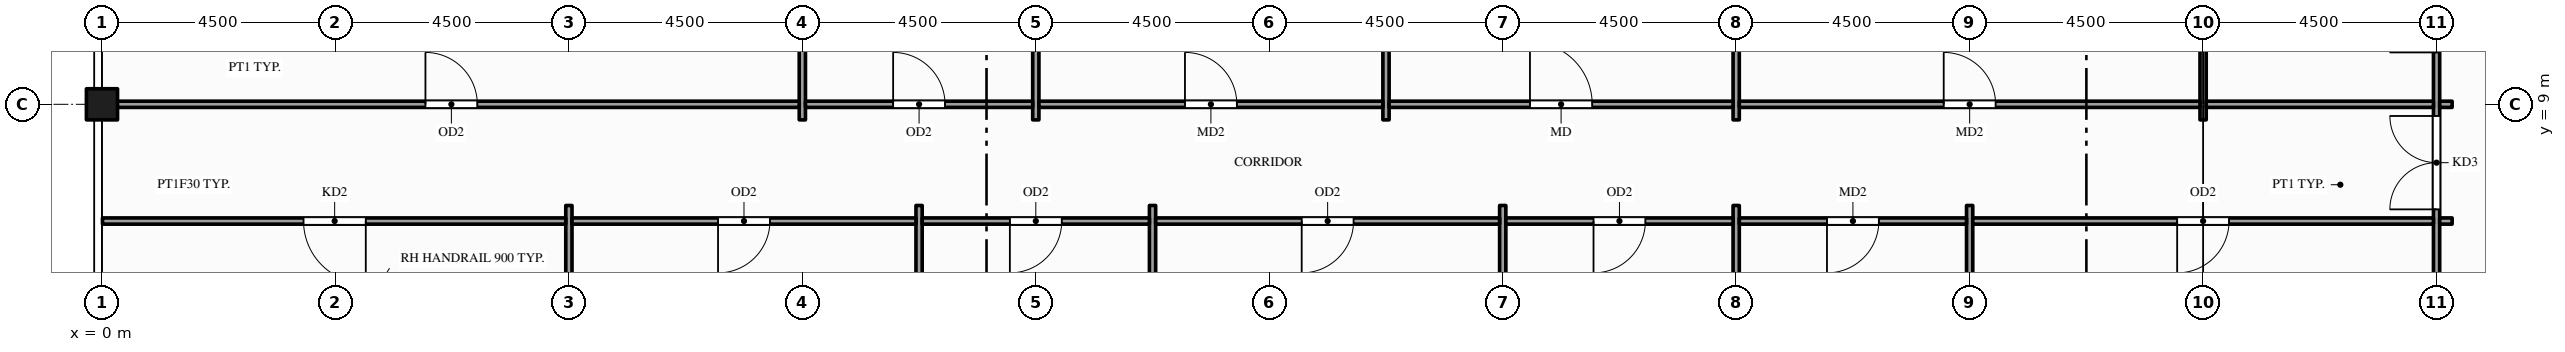
"""IFC4 building model, lengths in metres.
Left out: names, types, materials, properties, quantities, classifications, styles, units other than length and angle.
Written with IfcOpenShell. Run it as: python <this file> out.ifc"""

import sys

from ifc_helpers import new_model, si_unit, direction, frame, frame_2d, origin, origin_2d, place, context, subcontext, project, spatial, rectangle, hollow_rectangle, extrude, element, fill, save


model = new_model("IFC4")
c1 = context("Model", 3, precision=1e-05, world=origin(), true_north=direction((0.0, 1.0)))
c2 = subcontext(c1, "Body", "Model", "MODEL_VIEW")
j1 = project(units=[si_unit("LENGTHUNIT", "METRE"), si_unit("PLANEANGLEUNIT", "RADIAN")], contexts=[c1])
p1 = place(None, origin())
s1 = spatial("IfcSite", under=j1, at=p1, CompositionType="ELEMENT")
p2 = place(p1, origin())
s2 = spatial("IfcBuilding", under=s1, at=p2, CompositionType="ELEMENT")
p3 = place(p2, frame((0.0, 0.0, 341.0)))
s3 = spatial("IfcBuildingStorey", under=s2, at=p3, CompositionType="ELEMENT", Elevation=341.0)
p4 = place(p3, frame((0.0, 9.0, -0.15), z_axis=(0.0, 0.0, 1.0), x_axis=(1.0, 0.0, 0.0)))
e1 = element("IfcColumn", 1, at=p4, inside=s3, PredefinedType="COLUMN", context=c2, shape_type="SweptSolid", body=[
    extrude(hollow_rectangle(XDim=0.6, YDim=0.6, WallThickness=0.03, at=origin_2d()), origin(), (0.0, 0.0, 1.0), 4.4),
])
p5 = place(p3, frame((9.0, 3.875, 0.0), z_axis=(0.0, 0.0, 1.0), x_axis=(0.0, 1.0, 0.0)))
e2 = element("IfcWall", 2, at=p5, inside=s3, PredefinedType="PARTITIONING", context=c2, shape_type="SweptSolid", body=[
    extrude(rectangle(XDim=3.175, YDim=0.12, at=frame_2d((1.587, 0.0))), origin(), (0.0, 0.0, 1.0), 3.259),
])
p6 = place(p3, frame((13.5, 8.7, 0.0), z_axis=(0.0, 0.0, 1.0), x_axis=(0.0, 1.0, 0.0)))
e3 = element("IfcWall", 3, at=p6, inside=s3, PredefinedType="PARTITIONING", context=c2, shape_type="SweptSolid", body=[
    extrude(rectangle(XDim=13.79, YDim=0.12, at=frame_2d((6.895, 0.0))), origin(), (0.0, 0.0, 1.0), 3.259),
])
p7 = place(p3, frame((15.75, 0.01, 0.0), z_axis=(0.0, 0.0, 1.0), x_axis=(0.0, 1.0, 0.0)))
e4 = element("IfcWall", 4, at=p7, inside=s3, PredefinedType="PARTITIONING", context=c2, shape_type="SweptSolid", body=[
    extrude(rectangle(XDim=7.04, YDim=0.12, at=frame_2d((3.52, 0.0))), origin(), (0.0, 0.0, 1.0), 3.259),
])
p8 = place(p3, frame((18.0, 8.7, 0.0), z_axis=(0.0, 0.0, 1.0), x_axis=(0.0, 1.0, 0.0)))
e5 = element("IfcWall", 5, at=p8, inside=s3, PredefinedType="PARTITIONING", context=c2, shape_type="SweptSolid", body=[
    extrude(rectangle(XDim=13.79, YDim=0.12, at=frame_2d((6.895, 0.0))), origin(), (0.0, 0.0, 1.0), 3.259),
])
p9 = place(p3, frame((20.25, 0.01, 0.0), z_axis=(0.0, 0.0, 1.0), x_axis=(0.0, 1.0, 0.0)))
e6 = element("IfcWall", 6, at=p9, inside=s3, PredefinedType="PARTITIONING", context=c2, shape_type="SweptSolid", body=[
    extrude(rectangle(XDim=7.04, YDim=0.12, at=frame_2d((3.52, 0.0))), origin(), (0.0, 0.0, 1.0), 3.259),
])
p10 = place(p3, frame((24.75, 8.7, 0.0), z_axis=(0.0, 0.0, 1.0), x_axis=(0.0, 1.0, 0.0)))
e7 = element("IfcWall", 7, at=p10, inside=s3, PredefinedType="PARTITIONING", context=c2, shape_type="SweptSolid", body=[
    extrude(rectangle(XDim=13.79, YDim=0.12, at=frame_2d((6.895, 0.0))), origin(), (0.0, 0.0, 1.0), 3.259),
])
for number, where, z_axis, x_axis in (
    (8, (27.0, 0.01, 0.0), (0.0, 0.0, 1.0), (0.0, 1.0, 0.0)),
    (9, (31.5, 0.01, 0.0), (0.0, 0.0, 1.0), (0.0, 1.0, 0.0)),
):
    element("IfcWall", number, at=place(p3, frame(where, z_axis=z_axis, x_axis=x_axis)), inside=s3, PredefinedType="PARTITIONING", context=c2, shape_type="SweptSolid", body=[
        extrude(rectangle(XDim=7.04, YDim=0.12, at=frame_2d((3.52, 0.0))), origin(), (0.0, 0.0, 1.0), 3.259),
    ])
p11 = place(p3, frame((31.5, 8.7, 0.0), z_axis=(0.0, 0.0, 1.0), x_axis=(0.0, 1.0, 0.0)))
e10 = element("IfcWall", 10, at=p11, inside=s3, PredefinedType="PARTITIONING", context=c2, shape_type="SweptSolid", body=[
    extrude(rectangle(XDim=13.79, YDim=0.12, at=frame_2d((6.895, 0.0))), origin(), (0.0, 0.0, 1.0), 3.259),
])
p12 = place(p3, frame((36.0, 0.01, 0.0), z_axis=(0.0, 0.0, 1.0), x_axis=(0.0, 1.0, 0.0)))
e11 = element("IfcWall", 11, at=p12, inside=s3, PredefinedType="PARTITIONING", context=c2, shape_type="SweptSolid", body=[
    extrude(rectangle(XDim=7.04, YDim=0.12, at=frame_2d((3.52, 0.0))), origin(), (0.0, 0.0, 1.0), 3.259),
])
p13 = place(p3, frame((40.5, 8.7, 0.0), z_axis=(0.0, 0.0, 1.0), x_axis=(0.0, 1.0, 0.0)))
e12 = element("IfcWall", 12, at=p13, inside=s3, PredefinedType="PARTITIONING", context=c2, shape_type="SweptSolid", body=[
    extrude(rectangle(XDim=13.79, YDim=0.12, at=frame_2d((6.895, 0.0))), origin(), (0.0, 0.0, 1.0), 4.3),
])
p14 = place(p3, frame((45.0, 0.01, 0.0), z_axis=(0.0, 0.0, 1.0), x_axis=(0.0, 1.0, 0.0)))
e13 = element("IfcWall", 13, at=p14, inside=s3, PredefinedType="PARTITIONING", context=c2, shape_type="SweptSolid", body=[
    extrude(rectangle(XDim=22.48, YDim=0.12, at=frame_2d((11.24, 0.0))), origin(), (0.0, 0.0, 1.0), 3.309),
])
p15 = place(p14, frame((6.965, 0.0, 0.0)))
e14 = element("IfcOpeningElement", 14, at=p15, cuts=e13, PredefinedType="OPENING", context=c2, shape_type="SweptSolid", body=[
    extrude(rectangle(XDim=1.8, YDim=2.1, at=frame_2d((0.9, 1.05))), frame((0.0, 0.07, 0.0), z_axis=(0.0, -1.0, 0.0), x_axis=(1.0, 0.0, 0.0)), (0.0, 0.0, 1.0), 0.14),
])
p16 = place(p14, frame((9.99, 0.0, 0.0)))
e15 = element("IfcOpeningElement", 15, at=p16, cuts=e13, PredefinedType="OPENING", context=c2, shape_type="SweptSolid", body=[
    extrude(rectangle(XDim=0.9, YDim=2.1, at=frame_2d((0.45, 1.05))), frame((0.0, 0.07, 0.0), z_axis=(0.0, -1.0, 0.0), x_axis=(1.0, 0.0, 0.0)), (0.0, 0.0, 1.0), 0.14),
])
p17 = place(p14, frame((15.29, 0.0, 0.0)))
e16 = element("IfcOpeningElement", 16, at=p17, cuts=e13, PredefinedType="OPENING", context=c2, shape_type="SweptSolid", body=[
    extrude(rectangle(XDim=0.9, YDim=2.1, at=frame_2d((0.45, 1.05))), frame((0.0, 0.07, 0.0), z_axis=(0.0, -1.0, 0.0), x_axis=(1.0, 0.0, 0.0)), (0.0, 0.0, 1.0), 0.14),
])
p18 = place(p14, frame((20.49, 0.0, 0.0)))
e17 = element("IfcOpeningElement", 17, at=p18, cuts=e13, PredefinedType="OPENING", context=c2, shape_type="SweptSolid", body=[
    extrude(rectangle(XDim=1.0, YDim=2.1, at=frame_2d((0.5, 1.05))), frame((0.0, 0.07, 0.0), z_axis=(0.0, -1.0, 0.0), x_axis=(1.0, 0.0, 0.0)), (0.0, 0.0, 1.0), 0.14),
])
p19 = place(p3, frame((0.01, 6.75, 0.0), z_axis=(0.0, 0.0, 1.0), x_axis=(1.0, 0.0, 0.0)))
e18 = element("IfcWall", 18, at=p19, inside=s3, PredefinedType="PARTITIONING", context=c2, shape_type="SweptSolid", body=[
    extrude(rectangle(XDim=8.93, YDim=0.12, at=frame_2d((4.465, 0.0))), origin(), (0.0, 0.0, 1.0), 3.259),
])
p20 = place(p19, frame((3.875, 0.0, 0.0)))
e19 = element("IfcOpeningElement", 19, at=p20, cuts=e18, PredefinedType="OPENING", context=c2, shape_type="SweptSolid", body=[
    extrude(rectangle(XDim=1.2, YDim=2.1, at=frame_2d((0.6, 1.05))), frame((0.0, 0.07, 0.0), z_axis=(0.0, -1.0, 0.0), x_axis=(1.0, 0.0, 0.0)), (0.0, 0.0, 1.0), 0.14),
])
p21 = place(p3, frame((9.06, 6.75, 0.0), z_axis=(0.0, 0.0, 1.0), x_axis=(1.0, 0.0, 0.0)))
e20 = element("IfcWall", 20, at=p21, inside=s3, PredefinedType="PARTITIONING", context=c2, shape_type="SweptSolid", body=[
    extrude(rectangle(XDim=6.63, YDim=0.12, at=frame_2d((3.315, 0.0))), origin(), (0.0, 0.0, 1.0), 3.259),
])
p22 = place(p21, frame((2.815, 0.0, 0.0)))
e21 = element("IfcOpeningElement", 21, at=p22, cuts=e20, PredefinedType="OPENING", context=c2, shape_type="SweptSolid", body=[
    extrude(rectangle(XDim=1.0, YDim=2.1, at=frame_2d((0.5, 1.05))), frame((0.0, 0.07, 0.0), z_axis=(0.0, -1.0, 0.0), x_axis=(1.0, 0.0, 0.0)), (0.0, 0.0, 1.0), 0.14),
])
p23 = place(p3, frame((15.81, 6.75, 0.0), z_axis=(0.0, 0.0, 1.0), x_axis=(1.0, 0.0, 0.0)))
e22 = element("IfcWall", 22, at=p23, inside=s3, PredefinedType="PARTITIONING", context=c2, shape_type="SweptSolid", body=[
    extrude(rectangle(XDim=4.38, YDim=0.12, at=frame_2d((2.19, 0.0))), origin(), (0.0, 0.0, 1.0), 3.259),
])
p24 = place(p23, frame((1.69, 0.0, 0.0)))
e23 = element("IfcOpeningElement", 23, at=p24, cuts=e22, PredefinedType="OPENING", context=c2, shape_type="SweptSolid", body=[
    extrude(rectangle(XDim=1.0, YDim=2.1, at=frame_2d((0.5, 1.05))), frame((0.0, 0.07, 0.0), z_axis=(0.0, -1.0, 0.0), x_axis=(1.0, 0.0, 0.0)), (0.0, 0.0, 1.0), 0.14),
])
p25 = place(p3, frame((20.31, 6.75, 0.0), z_axis=(0.0, 0.0, 1.0), x_axis=(1.0, 0.0, 0.0)))
e24 = element("IfcWall", 24, at=p25, inside=s3, PredefinedType="PARTITIONING", context=c2, shape_type="SweptSolid", body=[
    extrude(rectangle(XDim=6.63, YDim=0.12, at=frame_2d((3.315, 0.0))), origin(), (0.0, 0.0, 1.0), 3.259),
])
p26 = place(p25, frame((2.815, 0.0, 0.0)))
e25 = element("IfcOpeningElement", 25, at=p26, cuts=e24, PredefinedType="OPENING", context=c2, shape_type="SweptSolid", body=[
    extrude(rectangle(XDim=1.0, YDim=2.1, at=frame_2d((0.5, 1.05))), frame((0.0, 0.07, 0.0), z_axis=(0.0, -1.0, 0.0), x_axis=(1.0, 0.0, 0.0)), (0.0, 0.0, 1.0), 0.14),
])
p27 = place(p3, frame((27.06, 6.75, 0.0), z_axis=(0.0, 0.0, 1.0), x_axis=(1.0, 0.0, 0.0)))
e26 = element("IfcWall", 26, at=p27, inside=s3, PredefinedType="PARTITIONING", context=c2, shape_type="SweptSolid", body=[
    extrude(rectangle(XDim=4.38, YDim=0.12, at=frame_2d((2.19, 0.0))), origin(), (0.0, 0.0, 1.0), 3.259),
])
p28 = place(p27, frame((1.69, 0.0, 0.0)))
e27 = element("IfcOpeningElement", 27, at=p28, cuts=e26, PredefinedType="OPENING", context=c2, shape_type="SweptSolid", body=[
    extrude(rectangle(XDim=1.0, YDim=2.1, at=frame_2d((0.5, 1.05))), frame((0.0, 0.07, 0.0), z_axis=(0.0, -1.0, 0.0), x_axis=(1.0, 0.0, 0.0)), (0.0, 0.0, 1.0), 0.14),
])
p29 = place(p3, frame((31.56, 6.75, 0.0), z_axis=(0.0, 0.0, 1.0), x_axis=(1.0, 0.0, 0.0)))
e28 = element("IfcWall", 28, at=p29, inside=s3, PredefinedType="PARTITIONING", context=c2, shape_type="SweptSolid", body=[
    extrude(rectangle(XDim=4.38, YDim=0.12, at=frame_2d((2.19, 0.0))), origin(), (0.0, 0.0, 1.0), 3.259),
])
p30 = place(p29, frame((1.69, 0.0, 0.0)))
e29 = element("IfcOpeningElement", 29, at=p30, cuts=e28, PredefinedType="OPENING", context=c2, shape_type="SweptSolid", body=[
    extrude(rectangle(XDim=1.0, YDim=2.1, at=frame_2d((0.5, 1.05))), frame((0.0, 0.07, 0.0), z_axis=(0.0, -1.0, 0.0), x_axis=(1.0, 0.0, 0.0)), (0.0, 0.0, 1.0), 0.14),
])
p31 = place(p3, frame((36.06, 6.75, 0.0), z_axis=(0.0, 0.0, 1.0), x_axis=(1.0, 0.0, 0.0)))
e30 = element("IfcWall", 30, at=p31, inside=s3, PredefinedType="PARTITIONING", context=c2, shape_type="SweptSolid", body=[
    extrude(rectangle(XDim=8.88, YDim=0.12, at=frame_2d((4.44, 0.0))), origin(), (0.0, 0.0, 1.0), 3.259),
])
p32 = place(p31, frame((3.94, 0.0, 0.0)))
e31 = element("IfcOpeningElement", 31, at=p32, cuts=e30, PredefinedType="OPENING", context=c2, shape_type="SweptSolid", body=[
    extrude(rectangle(XDim=1.0, YDim=2.1, at=frame_2d((0.5, 1.05))), frame((0.0, 0.07, 0.0), z_axis=(0.0, -1.0, 0.0), x_axis=(1.0, 0.0, 0.0)), (0.0, 0.0, 1.0), 0.14),
])
p33 = place(p3, frame((45.06, 6.75, 0.0), z_axis=(0.0, 0.0, 1.0), x_axis=(1.0, 0.0, 0.0)))
e32 = element("IfcWall", 32, at=p33, inside=s3, PredefinedType="PARTITIONING", context=c2, shape_type="SweptSolid", body=[
    extrude(rectangle(XDim=0.24, YDim=0.12, at=frame_2d((0.12, 0.0))), origin(), (0.0, 0.0, 1.0), 3.309),
])
p34 = place(p3, frame((0.01, 9.0, 0.0), z_axis=(0.0, 0.0, 1.0), x_axis=(1.0, 0.0, 0.0)))
e33 = element("IfcWall", 33, at=p34, inside=s3, PredefinedType="PARTITIONING", context=c2, shape_type="SweptSolid", body=[
    extrude(rectangle(XDim=13.43, YDim=0.12, at=frame_2d((6.715, 0.0))), origin(), (0.0, 0.0, 1.0), 3.259),
])
p35 = place(p34, frame((6.225, 0.0, 0.0)))
e34 = element("IfcOpeningElement", 34, at=p35, cuts=e33, PredefinedType="OPENING", context=c2, shape_type="SweptSolid", body=[
    extrude(rectangle(XDim=1.0, YDim=2.1, at=frame_2d((0.5, 1.05))), frame((0.0, 0.07, 0.0), z_axis=(0.0, -1.0, 0.0), x_axis=(1.0, 0.0, 0.0)), (0.0, 0.0, 1.0), 0.14),
])
p36 = place(p3, frame((13.56, 9.0, 0.0), z_axis=(0.0, 0.0, 1.0), x_axis=(1.0, 0.0, 0.0)))
e35 = element("IfcWall", 35, at=p36, inside=s3, PredefinedType="PARTITIONING", context=c2, shape_type="SweptSolid", body=[
    extrude(rectangle(XDim=4.38, YDim=0.12, at=frame_2d((2.19, 0.0))), origin(), (0.0, 0.0, 1.0), 3.259),
])
p37 = place(p36, frame((1.69, 0.0, 0.0)))
e36 = element("IfcOpeningElement", 36, at=p37, cuts=e35, PredefinedType="OPENING", context=c2, shape_type="SweptSolid", body=[
    extrude(rectangle(XDim=1.0, YDim=2.1, at=frame_2d((0.5, 1.05))), frame((0.0, 0.07, 0.0), z_axis=(0.0, -1.0, 0.0), x_axis=(1.0, 0.0, 0.0)), (0.0, 0.0, 1.0), 0.14),
])
p38 = place(p3, frame((18.06, 9.0, 0.0), z_axis=(0.0, 0.0, 1.0), x_axis=(1.0, 0.0, 0.0)))
e37 = element("IfcWall", 37, at=p38, inside=s3, PredefinedType="PARTITIONING", context=c2, shape_type="SweptSolid", body=[
    extrude(rectangle(XDim=6.63, YDim=0.12, at=frame_2d((3.315, 0.0))), origin(), (0.0, 0.0, 1.0), 3.259),
])
p39 = place(p38, frame((2.815, 0.0, 0.0)))
e38 = element("IfcOpeningElement", 38, at=p39, cuts=e37, PredefinedType="OPENING", context=c2, shape_type="SweptSolid", body=[
    extrude(rectangle(XDim=1.0, YDim=2.1, at=frame_2d((0.5, 1.05))), frame((0.0, 0.07, 0.0), z_axis=(0.0, -1.0, 0.0), x_axis=(1.0, 0.0, 0.0)), (0.0, 0.0, 1.0), 0.14),
])
p40 = place(p3, frame((24.81, 9.0, 0.0), z_axis=(0.0, 0.0, 1.0), x_axis=(1.0, 0.0, 0.0)))
e39 = element("IfcWall", 39, at=p40, inside=s3, PredefinedType="PARTITIONING", context=c2, shape_type="SweptSolid", body=[
    extrude(rectangle(XDim=6.63, YDim=0.12, at=frame_2d((3.315, 0.0))), origin(), (0.0, 0.0, 1.0), 3.259),
])
p41 = place(p40, frame((2.715, 0.0, 0.0)))
e40 = element("IfcOpeningElement", 40, at=p41, cuts=e39, PredefinedType="OPENING", context=c2, shape_type="SweptSolid", body=[
    extrude(rectangle(XDim=1.2, YDim=2.1, at=frame_2d((0.6, 1.05))), frame((0.0, 0.07, 0.0), z_axis=(0.0, -1.0, 0.0), x_axis=(1.0, 0.0, 0.0)), (0.0, 0.0, 1.0), 0.14),
])
p42 = place(p3, frame((31.56, 9.0, 0.0), z_axis=(0.0, 0.0, 1.0), x_axis=(1.0, 0.0, 0.0)))
e41 = element("IfcWall", 41, at=p42, inside=s3, PredefinedType="PARTITIONING", context=c2, shape_type="SweptSolid", body=[
    extrude(rectangle(XDim=8.88, YDim=0.12, at=frame_2d((4.44, 0.0))), origin(), (0.0, 0.0, 1.0), 3.259),
])
p43 = place(p42, frame((3.94, 0.0, 0.0)))
e42 = element("IfcOpeningElement", 42, at=p43, cuts=e41, PredefinedType="OPENING", context=c2, shape_type="SweptSolid", body=[
    extrude(rectangle(XDim=1.0, YDim=2.1, at=frame_2d((0.5, 1.05))), frame((0.0, 0.07, 0.0), z_axis=(0.0, -1.0, 0.0), x_axis=(1.0, 0.0, 0.0)), (0.0, 0.0, 1.0), 0.14),
])
p44 = place(p3, frame((40.56, 9.0, 0.0), z_axis=(0.0, 0.0, 1.0), x_axis=(1.0, 0.0, 0.0)))
e43 = element("IfcWall", 43, at=p44, inside=s3, PredefinedType="PARTITIONING", context=c2, shape_type="SweptSolid", body=[
    extrude(rectangle(XDim=4.38, YDim=0.12, at=frame_2d((2.19, 0.0))), origin(), (0.0, 0.0, 1.0), 3.309),
])
p45 = place(p3, frame((45.06, 9.0, 0.0), z_axis=(0.0, 0.0, 1.0), x_axis=(1.0, 0.0, 0.0)))
e44 = element("IfcWall", 44, at=p45, inside=s3, PredefinedType="PARTITIONING", context=c2, shape_type="SweptSolid", body=[
    extrude(rectangle(XDim=0.24, YDim=0.12, at=frame_2d((0.12, 0.0))), origin(), (0.0, 0.0, 1.0), 3.309),
])
p46 = place(p15, origin())
e45 = element("IfcDoor", 45, at=p46, inside=s3, OperationType="DOUBLE_DOOR_SINGLE_SWING", PredefinedType="DOOR", context=c2, shape_type="SweptSolid", body=[
    extrude(rectangle(XDim=1.8, YDim=2.1, at=frame_2d((0.9, 1.05))), frame((0.0, 0.025, 0.0), z_axis=(0.0, -1.0, 0.0), x_axis=(1.0, 0.0, 0.0)), (0.0, 0.0, 1.0), 0.05),
])
fill(e14, e45)
p47 = place(p20, origin())
e46 = element("IfcDoor", 46, at=p47, inside=s3, OperationType="SINGLE_SWING_RIGHT", PredefinedType="DOOR", context=c2, shape_type="SweptSolid", body=[
    extrude(rectangle(XDim=1.2, YDim=2.1, at=frame_2d((0.6, 1.05))), frame((0.0, 0.025, 0.0), z_axis=(0.0, -1.0, 0.0), x_axis=(1.0, 0.0, 0.0)), (0.0, 0.0, 1.0), 0.05),
])
fill(e19, e46)
p48 = place(p22, origin())
e47 = element("IfcDoor", 47, at=p48, inside=s3, OperationType="SINGLE_SWING_LEFT", PredefinedType="DOOR", context=c2, shape_type="SweptSolid", body=[
    extrude(rectangle(XDim=1.0, YDim=2.1, at=frame_2d((0.5, 1.05))), frame((0.0, 0.025, 0.0), z_axis=(0.0, -1.0, 0.0), x_axis=(1.0, 0.0, 0.0)), (0.0, 0.0, 1.0), 0.05),
])
fill(e21, e47)
p49 = place(p24, origin())
e48 = element("IfcDoor", 48, at=p49, inside=s3, OperationType="SINGLE_SWING_LEFT", PredefinedType="DOOR", context=c2, shape_type="SweptSolid", body=[
    extrude(rectangle(XDim=1.0, YDim=2.1, at=frame_2d((0.5, 1.05))), frame((0.0, 0.025, 0.0), z_axis=(0.0, -1.0, 0.0), x_axis=(1.0, 0.0, 0.0)), (0.0, 0.0, 1.0), 0.05),
])
fill(e23, e48)
p50 = place(p26, origin())
e49 = element("IfcDoor", 49, at=p50, inside=s3, OperationType="SINGLE_SWING_LEFT", PredefinedType="DOOR", context=c2, shape_type="SweptSolid", body=[
    extrude(rectangle(XDim=1.0, YDim=2.1, at=frame_2d((0.5, 1.05))), frame((0.0, 0.025, 0.0), z_axis=(0.0, -1.0, 0.0), x_axis=(1.0, 0.0, 0.0)), (0.0, 0.0, 1.0), 0.05),
])
fill(e25, e49)
p51 = place(p28, origin())
e50 = element("IfcDoor", 50, at=p51, inside=s3, OperationType="SINGLE_SWING_LEFT", PredefinedType="DOOR", context=c2, shape_type="SweptSolid", body=[
    extrude(rectangle(XDim=1.0, YDim=2.1, at=frame_2d((0.5, 1.05))), frame((0.0, 0.025, 0.0), z_axis=(0.0, -1.0, 0.0), x_axis=(1.0, 0.0, 0.0)), (0.0, 0.0, 1.0), 0.05),
])
fill(e27, e50)
p52 = place(p30, origin())
e51 = element("IfcDoor", 51, at=p52, inside=s3, OperationType="SINGLE_SWING_LEFT", PredefinedType="DOOR", context=c2, shape_type="SweptSolid", body=[
    extrude(rectangle(XDim=1.0, YDim=2.1, at=frame_2d((0.5, 1.05))), frame((0.0, 0.025, 0.0), z_axis=(0.0, -1.0, 0.0), x_axis=(1.0, 0.0, 0.0)), (0.0, 0.0, 1.0), 0.05),
])
fill(e29, e51)
p53 = place(p32, origin())
e52 = element("IfcDoor", 52, at=p53, inside=s3, OperationType="SINGLE_SWING_LEFT", PredefinedType="DOOR", context=c2, shape_type="SweptSolid", body=[
    extrude(rectangle(XDim=1.0, YDim=2.1, at=frame_2d((0.5, 1.05))), frame((0.0, 0.025, 0.0), z_axis=(0.0, -1.0, 0.0), x_axis=(1.0, 0.0, 0.0)), (0.0, 0.0, 1.0), 0.05),
])
fill(e31, e52)
p54 = place(p35, origin())
e53 = element("IfcDoor", 53, at=p54, inside=s3, OperationType="SINGLE_SWING_LEFT", PredefinedType="DOOR", context=c2, shape_type="SweptSolid", body=[
    extrude(rectangle(XDim=1.0, YDim=2.1, at=frame_2d((0.5, 1.05))), frame((0.0, 0.025, 0.0), z_axis=(0.0, -1.0, 0.0), x_axis=(1.0, 0.0, 0.0)), (0.0, 0.0, 1.0), 0.05),
])
fill(e34, e53)
p55 = place(p37, origin())
e54 = element("IfcDoor", 54, at=p55, inside=s3, OperationType="SINGLE_SWING_LEFT", PredefinedType="DOOR", context=c2, shape_type="SweptSolid", body=[
    extrude(rectangle(XDim=1.0, YDim=2.1, at=frame_2d((0.5, 1.05))), frame((0.0, 0.025, 0.0), z_axis=(0.0, -1.0, 0.0), x_axis=(1.0, 0.0, 0.0)), (0.0, 0.0, 1.0), 0.05),
])
fill(e36, e54)
p56 = place(p39, origin())
e55 = element("IfcDoor", 55, at=p56, inside=s3, OperationType="SINGLE_SWING_LEFT", PredefinedType="DOOR", context=c2, shape_type="SweptSolid", body=[
    extrude(rectangle(XDim=1.0, YDim=2.1, at=frame_2d((0.5, 1.05))), frame((0.0, 0.025, 0.0), z_axis=(0.0, -1.0, 0.0), x_axis=(1.0, 0.0, 0.0)), (0.0, 0.0, 1.0), 0.05),
])
fill(e38, e55)
p57 = place(p41, origin())
e56 = element("IfcDoor", 56, at=p57, inside=s3, OperationType="SINGLE_SWING_LEFT", PredefinedType="DOOR", context=c2, shape_type="SweptSolid", body=[
    extrude(rectangle(XDim=1.2, YDim=2.1, at=frame_2d((0.6, 1.05))), frame((0.0, 0.025, 0.0), z_axis=(0.0, -1.0, 0.0), x_axis=(1.0, 0.0, 0.0)), (0.0, 0.0, 1.0), 0.05),
])
fill(e40, e56)
p58 = place(p43, origin())
e57 = element("IfcDoor", 57, at=p58, inside=s3, OperationType="SINGLE_SWING_LEFT", PredefinedType="DOOR", context=c2, shape_type="SweptSolid", body=[
    extrude(rectangle(XDim=1.0, YDim=2.1, at=frame_2d((0.5, 1.05))), frame((0.0, 0.025, 0.0), z_axis=(0.0, -1.0, 0.0), x_axis=(1.0, 0.0, 0.0)), (0.0, 0.0, 1.0), 0.05),
])
fill(e42, e57)
save(model, sys.argv[1])
